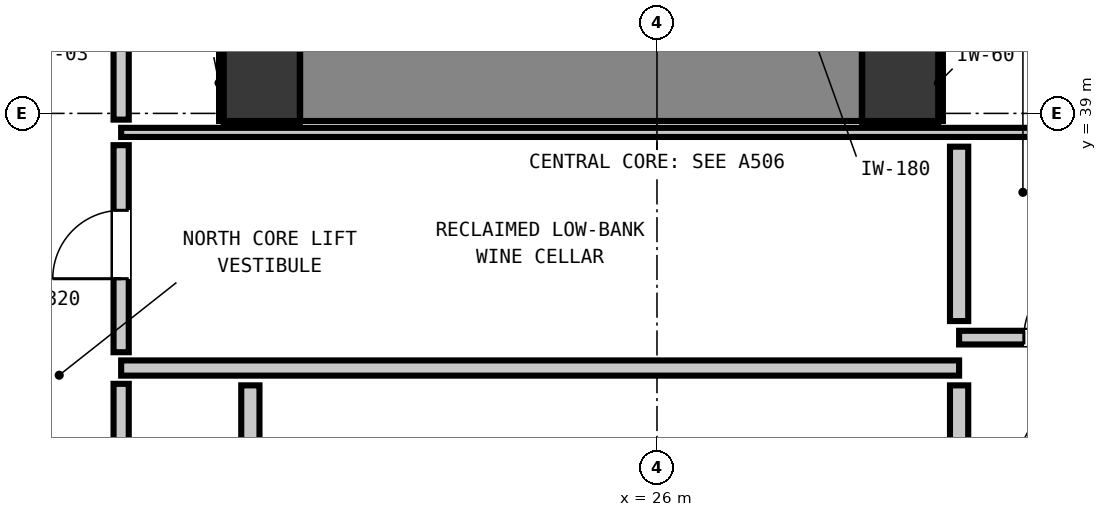
"""IFC4 building model, lengths in metres.
Left out: names, types, materials, properties, quantities, classifications, styles, units other than length and angle.
Written with IfcOpenShell. Run it as: python <this file> out.ifc"""

import sys

from ifc_helpers import new_model, si_unit, direction, frame, frame_2d, origin, origin_2d, place, context, subcontext, project, spatial, rectangle, extrude, element, fill, save


model = new_model("IFC4")
c1 = context("Model", 3, precision=1e-05, world=origin(), true_north=direction((0.0, 1.0)))
c2 = subcontext(c1, "Body", "Model", "MODEL_VIEW")
j1 = project(units=[si_unit("LENGTHUNIT", "METRE"), si_unit("PLANEANGLEUNIT", "RADIAN")], contexts=[c1])
p1 = place(None, origin())
s1 = spatial("IfcSite", under=j1, at=p1, CompositionType="ELEMENT")
p2 = place(p1, origin())
s2 = spatial("IfcBuilding", under=s1, at=p2, CompositionType="ELEMENT")
p3 = place(p2, frame((0.0, 0.0, 129.32)))
s3 = spatial("IfcBuildingStorey", under=s2, at=p3, CompositionType="ELEMENT", Elevation=129.32)
for number, where, z_axis, x_axis in (
    (1, (20.8, 39.4, 0.0), (0.0, 0.0, 1.0), (1.0, 0.0, 0.0)),
    (2, (29.2, 39.4, 0.0), (0.0, 0.0, 1.0), (1.0, 0.0, 0.0)),
):
    element("IfcColumn", number, at=place(p3, frame(where, z_axis=z_axis, x_axis=x_axis)), inside=s3, PredefinedType="COLUMN", context=c2, shape_type="SweptSolid", body=[
        extrude(rectangle(XDim=1.0, YDim=1.0, at=origin_2d()), origin(), (0.0, 0.0, 1.0), 3.32),
    ])
p4 = place(p3, frame((21.305, 39.4, 0.0), z_axis=(0.0, 0.0, 1.0), x_axis=(1.0, 0.0, 0.0)))
e3 = element("IfcWall", 3, at=p4, inside=s3, PredefinedType="SHEAR", context=c2, shape_type="SweptSolid", body=[
    extrude(rectangle(XDim=7.39, YDim=1.0, at=frame_2d((3.695, 0.0))), origin(), (0.0, 0.0, 1.0), 3.32),
])
p5 = place(p3, frame((18.95, 35.65, 0.0), z_axis=(0.0, 0.0, 1.0), x_axis=(1.0, 0.0, 0.0)))
e4 = element("IfcWall", 4, at=p5, inside=s3, PredefinedType="PARTITIONING", context=c2, shape_type="SweptSolid", body=[
    extrude(rectangle(XDim=11.025, YDim=0.2, at=frame_2d((5.513, 0.0))), origin(), (0.0, 0.0, 1.0), 3.08),
])
p6 = place(p3, frame((29.975, 36.05, 0.0), z_axis=(0.0, 0.0, 1.0), x_axis=(1.0, 0.0, 0.0)))
e5 = element("IfcWall", 5, at=p6, inside=s3, PredefinedType="PARTITIONING", context=c2, shape_type="SweptSolid", body=[
    extrude(rectangle(XDim=2.505, YDim=0.18, at=frame_2d((1.252, 0.0))), origin(), (0.0, 0.0, 1.0), 3.08),
])
p7 = place(p6, frame((0.852, 0.0, 0.0)))
e6 = element("IfcOpeningElement", 6, at=p7, cuts=e5, PredefinedType="OPENING", context=c2, shape_type="SweptSolid", body=[
    extrude(rectangle(XDim=0.9, YDim=2.1, at=frame_2d((0.45, 1.05))), frame((0.0, 0.1, 0.0), z_axis=(0.0, -1.0, 0.0), x_axis=(1.0, 0.0, 0.0)), (0.0, 0.0, 1.0), 0.2),
])
p8 = place(p3, frame((18.95, 38.75, 0.0), z_axis=(0.0, 0.0, 1.0), x_axis=(1.0, 0.0, 0.0)))
e7 = element("IfcWall", 7, at=p8, inside=s3, PredefinedType="PARTITIONING", context=c2, shape_type="SweptSolid", body=[
    extrude(rectangle(XDim=13.56, YDim=0.12, at=frame_2d((6.78, 0.0))), origin(), (0.0, 0.0, 1.0), 3.08),
])
p9 = place(p3, frame((20.65, 33.148, 0.0), z_axis=(0.0, 0.0, 1.0), x_axis=(0.0, 1.0, 0.0)))
e8 = element("IfcWall", 8, at=p9, inside=s3, PredefinedType="PARTITIONING", context=c2, shape_type="SweptSolid", body=[
    extrude(rectangle(XDim=2.274, YDim=0.24, at=frame_2d((1.137, 0.0))), origin(), (0.0, 0.0, 1.0), 2.315),
])
p10 = place(p3, frame((29.975, 34.498, 0.0), z_axis=(0.0, 0.0, 1.0), x_axis=(0.0, 1.0, 0.0)))
e9 = element("IfcWall", 9, at=p10, inside=s3, PredefinedType="PARTITIONING", context=c2, shape_type="SweptSolid", body=[
    extrude(rectangle(XDim=0.924, YDim=0.24, at=frame_2d((0.462, 0.0))), origin(), (0.0, 0.0, 1.0), 3.08),
])
p11 = place(p3, frame((29.975, 36.268, 0.0), z_axis=(0.0, 0.0, 1.0), x_axis=(0.0, 1.0, 0.0)))
e10 = element("IfcWall", 10, at=p11, inside=s3, PredefinedType="PARTITIONING", context=c2, shape_type="SweptSolid", body=[
    extrude(rectangle(XDim=2.294, YDim=0.24, at=frame_2d((1.147, 0.0))), origin(), (0.0, 0.0, 1.0), 3.08),
])
p12 = place(p3, frame((18.95, 33.128, 0.0), z_axis=(0.0, 0.0, 1.0), x_axis=(0.0, 1.0, 0.0)))
e11 = element("IfcWall", 11, at=p12, inside=s3, PredefinedType="PARTITIONING", context=c2, shape_type="SweptSolid", body=[
    extrude(rectangle(XDim=2.314, YDim=0.2, at=frame_2d((1.157, 0.0))), origin(), (0.0, 0.0, 1.0), 3.08),
])
p13 = place(p3, frame((18.95, 35.858, 0.0), z_axis=(0.0, 0.0, 1.0), x_axis=(0.0, 1.0, 0.0)))
e12 = element("IfcWall", 12, at=p13, inside=s3, PredefinedType="PARTITIONING", context=c2, shape_type="SweptSolid", body=[
    extrude(rectangle(XDim=2.724, YDim=0.2, at=frame_2d((1.362, 0.0))), origin(), (0.0, 0.0, 1.0), 3.08),
])
p14 = place(p13, frame((0.967, 0.0, 0.0)))
e13 = element("IfcOpeningElement", 13, at=p14, cuts=e12, PredefinedType="OPENING", context=c2, shape_type="SweptSolid", body=[
    extrude(rectangle(XDim=0.9, YDim=2.1, at=frame_2d((0.45, 1.05))), frame((0.0, 0.11, 0.0), z_axis=(0.0, -1.0, 0.0), x_axis=(1.0, 0.0, 0.0)), (0.0, 0.0, 1.0), 0.22),
])
p15 = place(p3, frame((18.95, 38.918, 0.0), z_axis=(0.0, 0.0, 1.0), x_axis=(0.0, 1.0, 0.0)))
e14 = element("IfcWall", 14, at=p15, inside=s3, PredefinedType="PARTITIONING", context=c2, shape_type="SweptSolid", body=[
    extrude(rectangle(XDim=1.134, YDim=0.2, at=frame_2d((0.567, 0.0))), origin(), (0.0, 0.0, 1.0), 3.08),
])
for number, where, z_axis, x_axis in (
    (15, (20.3, 38.868, 0.0), (0.0, 0.0, 1.0), (1.0, 0.0, 0.0)),
    (16, (20.268, 38.9, 0.0), (0.0, 0.0, 1.0), (0.0, 1.0, 0.0)),
    (17, (28.7, 38.868, 0.0), (0.0, 0.0, 1.0), (1.0, 0.0, 0.0)),
    (18, (29.732, 38.9, 0.0), (0.0, 0.0, 1.0), (0.0, 1.0, 0.0)),
):
    element("IfcWall", number, at=place(p3, frame(where, z_axis=z_axis, x_axis=x_axis)), inside=s3, PredefinedType="PARTITIONING", context=c2, shape_type="SweptSolid", body=[
        extrude(rectangle(XDim=1.0, YDim=0.06, at=frame_2d((0.5, 0.0))), origin(), (0.0, 0.0, 1.0), 1.45),
    ])
p16 = place(p7, origin())
e19 = element("IfcDoor", 19, at=p16, inside=s3, OperationType="SINGLE_SWING_RIGHT", PredefinedType="DOOR", context=c2, shape_type="SweptSolid", body=[
    extrude(rectangle(XDim=0.9, YDim=2.1, at=frame_2d((0.45, 1.05))), frame((0.0, 0.025, 0.0), z_axis=(0.0, -1.0, 0.0), x_axis=(1.0, 0.0, 0.0)), (0.0, 0.0, 1.0), 0.05),
])
fill(e6, e19)
p17 = place(p14, origin())
e20 = element("IfcDoor", 20, at=p17, inside=s3, OperationType="SINGLE_SWING_LEFT", PredefinedType="DOOR", context=c2, shape_type="SweptSolid", body=[
    extrude(rectangle(XDim=0.9, YDim=2.1, at=frame_2d((0.45, 1.05))), frame((0.0, 0.025, 0.0), z_axis=(0.0, -1.0, 0.0), x_axis=(1.0, 0.0, 0.0)), (0.0, 0.0, 1.0), 0.05),
])
fill(e13, e20)
save(model, sys.argv[1])
